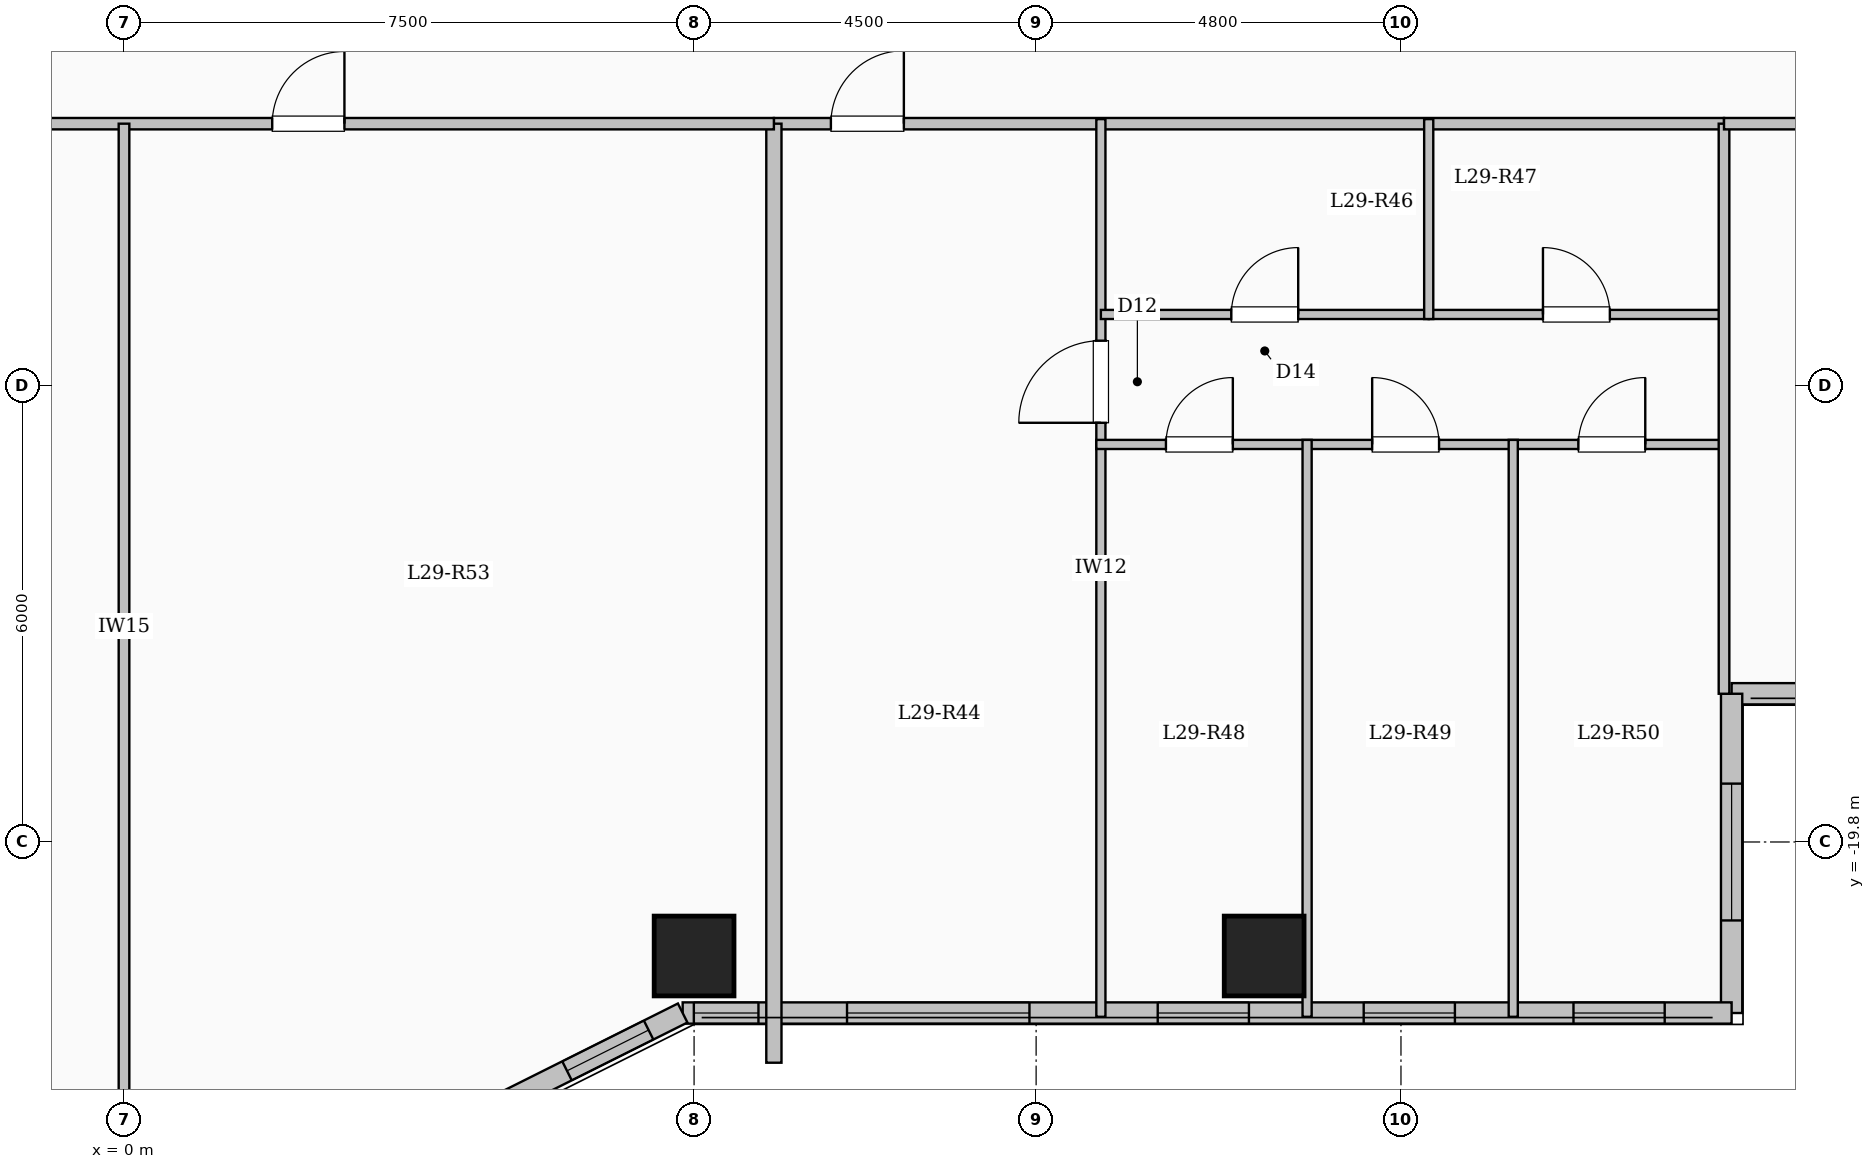
"""IFC4 building model, lengths in metres.
Left out: names, types, materials, properties, quantities, classifications, styles, units other than length and angle.
Written with IfcOpenShell. Run it as: python <this file> out.ifc"""

import sys

from ifc_helpers import new_model, si_unit, direction, frame, frame_2d, origin, origin_2d, place, context, subcontext, project, spatial, rectangle, extrude, element, fill, save


model = new_model("IFC4")
c1 = context("Model", 3, precision=1e-05, world=origin(), true_north=direction((0.0, 1.0)))
c2 = subcontext(c1, "Body", "Model", "MODEL_VIEW")
j1 = project(units=[si_unit("LENGTHUNIT", "METRE"), si_unit("PLANEANGLEUNIT", "RADIAN")], contexts=[c1])
p1 = place(None, origin())
s1 = spatial("IfcSite", under=j1, at=p1, CompositionType="ELEMENT")
p2 = place(p1, origin())
s2 = spatial("IfcBuilding", under=s1, at=p2, CompositionType="ELEMENT")
p3 = place(p2, frame((0.0, 0.0, 108.45)))
s3 = spatial("IfcBuildingStorey", under=s2, at=p3, CompositionType="ELEMENT", Elevation=108.45)
for number, where, z_axis, x_axis in (
    (1, (7.5, -21.3, 0.0), (0.0, 0.0, 1.0), (1.0, 0.0, 0.0)),
    (2, (15.0, -21.3, 0.0), (0.0, 0.0, 1.0), (1.0, 0.0, 0.0)),
):
    element("IfcColumn", number, at=place(p3, frame(where, z_axis=z_axis, x_axis=x_axis)), inside=s3, PredefinedType="COLUMN", context=c2, shape_type="SweptSolid", body=[
        extrude(rectangle(XDim=1.05, YDim=1.05, at=origin_2d()), origin(), (0.0, 0.0, 1.0), 3.35),
    ])
p4 = place(p3, frame((26.85, -17.85, 0.0), z_axis=(0.0, 0.0, 1.0), x_axis=(-1.0, 0.0, 0.0)))
e3 = element("IfcWall", 3, at=p4, inside=s3, PredefinedType="SOLIDWALL", context=c2, shape_type="SweptSolid", body=[
    extrude(rectangle(XDim=5.7, YDim=0.28, at=frame_2d((2.85, 0.0))), origin(), (0.0, 0.0, 1.0), 3.1),
])
p5 = place(p4, frame((1.675, 0.0, 0.9)))
e4 = element("IfcOpeningElement", 4, at=p5, cuts=e3, PredefinedType="OPENING", context=c2, shape_type="SweptSolid", body=[
    extrude(rectangle(XDim=2.4, YDim=1.8, at=frame_2d((1.2, 0.9))), frame((0.0, 0.15, 0.0), z_axis=(0.0, -1.0, 0.0), x_axis=(1.0, 0.0, 0.0)), (0.0, 0.0, 1.0), 0.3),
])
p6 = place(p3, frame((21.15, -17.85, 0.0), z_axis=(0.0, 0.0, 1.0), x_axis=(0.0, -1.0, 0.0)))
e5 = element("IfcWall", 5, at=p6, inside=s3, PredefinedType="SOLIDWALL", context=c2, shape_type="SweptSolid", body=[
    extrude(rectangle(XDim=4.2, YDim=0.28, at=frame_2d((2.1, 0.0))), origin(), (0.0, 0.0, 1.0), 3.1),
])
p7 = place(p6, frame((1.182, 0.0, 0.9)))
e6 = element("IfcOpeningElement", 6, at=p7, cuts=e5, PredefinedType="OPENING", context=c2, shape_type="SweptSolid", body=[
    extrude(rectangle(XDim=1.8, YDim=1.65, at=frame_2d((0.9, 0.825))), frame((0.0, 0.15, 0.0), z_axis=(0.0, -1.0, 0.0), x_axis=(1.0, 0.0, 0.0)), (0.0, 0.0, 1.0), 0.3),
])
p8 = place(p3, frame((21.15, -22.05, 0.0), z_axis=(0.0, 0.0, 1.0), x_axis=(-1.0, 0.0, 0.0)))
e7 = element("IfcWall", 7, at=p8, inside=s3, PredefinedType="SOLIDWALL", context=c2, shape_type="SweptSolid", body=[
    extrude(rectangle(XDim=13.8, YDim=0.28, at=frame_2d((6.9, 0.0))), origin(), (0.0, 0.0, 1.0), 3.1),
])
p9 = place(p8, frame((0.88, 0.0, 0.95)))
e8 = element("IfcOpeningElement", 8, at=p9, cuts=e7, PredefinedType="OPENING", context=c2, shape_type="SweptSolid", body=[
    extrude(rectangle(XDim=1.2, YDim=1.5, at=frame_2d((0.6, 0.75))), frame((0.0, 0.15, 0.0), z_axis=(0.0, -1.0, 0.0), x_axis=(1.0, 0.0, 0.0)), (0.0, 0.0, 1.0), 0.3),
])
p10 = place(p8, frame((3.64, 0.0, 0.95)))
e9 = element("IfcOpeningElement", 9, at=p10, cuts=e7, PredefinedType="OPENING", context=c2, shape_type="SweptSolid", body=[
    extrude(rectangle(XDim=1.2, YDim=1.5, at=frame_2d((0.6, 0.75))), frame((0.0, 0.15, 0.0), z_axis=(0.0, -1.0, 0.0), x_axis=(1.0, 0.0, 0.0)), (0.0, 0.0, 1.0), 0.3),
])
p11 = place(p8, frame((6.35, 0.0, 0.95)))
e10 = element("IfcOpeningElement", 10, at=p11, cuts=e7, PredefinedType="OPENING", context=c2, shape_type="SweptSolid", body=[
    extrude(rectangle(XDim=1.2, YDim=1.5, at=frame_2d((0.6, 0.75))), frame((0.0, 0.15, 0.0), z_axis=(0.0, -1.0, 0.0), x_axis=(1.0, 0.0, 0.0)), (0.0, 0.0, 1.0), 0.3),
])
p12 = place(p8, frame((9.238, 0.0, 0.9)))
e11 = element("IfcOpeningElement", 11, at=p12, cuts=e7, PredefinedType="OPENING", context=c2, shape_type="SweptSolid", body=[
    extrude(rectangle(XDim=2.4, YDim=1.8, at=frame_2d((1.2, 0.9))), frame((0.0, 0.15, 0.0), z_axis=(0.0, -1.0, 0.0), x_axis=(1.0, 0.0, 0.0)), (0.0, 0.0, 1.0), 0.3),
])
p13 = place(p8, frame((12.803, 0.0, 0.95)))
e12 = element("IfcOpeningElement", 12, at=p13, cuts=e7, PredefinedType="OPENING", context=c2, shape_type="SweptSolid", body=[
    extrude(rectangle(XDim=0.85, YDim=1.5, at=frame_2d((0.425, 0.75))), frame((0.0, 0.15, 0.0), z_axis=(0.0, -1.0, 0.0), x_axis=(1.0, 0.0, 0.0)), (0.0, 0.0, 1.0), 0.3),
])
p14 = place(p3, frame((7.35, -22.05, 0.0), z_axis=(0.0, 0.0, 1.0), x_axis=(-0.894427191, -0.4472135955, 0.0)))
e13 = element("IfcWall", 13, at=p14, inside=s3, PredefinedType="SOLIDWALL", context=c2, shape_type="SweptSolid", body=[
    extrude(rectangle(XDim=3.354, YDim=0.28, at=frame_2d((1.677, 0.0))), origin(), (0.0, 0.0, 1.0), 3.1),
])
p15 = place(p14, frame((0.501, 0.0, 0.95)))
e14 = element("IfcOpeningElement", 14, at=p15, cuts=e13, PredefinedType="OPENING", context=c2, shape_type="SweptSolid", body=[
    extrude(rectangle(XDim=1.2, YDim=1.5, at=frame_2d((0.6, 0.75))), frame((0.0, 0.15, 0.0), z_axis=(0.0, -1.0, 0.0), x_axis=(1.0, 0.0, 0.0)), (0.0, 0.0, 1.0), 0.3),
])
p16 = place(p3, frame((8.55, -10.35, 0.0), z_axis=(0.0, 0.0, 1.0), x_axis=(1.0, 0.0, 0.0)))
e15 = element("IfcWall", 15, at=p16, inside=s3, PredefinedType="PARTITIONING", context=c2, shape_type="SweptSolid", body=[
    extrude(rectangle(XDim=12.5, YDim=0.15, at=frame_2d((6.25, 0.0))), origin(), (0.0, 0.0, 1.0), 3.1),
])
p17 = place(p16, frame((0.75, 0.0, 0.0)))
e16 = element("IfcOpeningElement", 16, at=p17, cuts=e15, PredefinedType="OPENING", context=c2, shape_type="SweptSolid", body=[
    extrude(rectangle(XDim=0.96, YDim=2.15, at=frame_2d((0.48, 1.075))), frame((0.0, 0.085, 0.0), z_axis=(0.0, -1.0, 0.0), x_axis=(1.0, 0.0, 0.0)), (0.0, 0.0, 1.0), 0.17),
])
p18 = place(p3, frame((12.852, -22.1, 0.0), z_axis=(0.0, 0.0, 1.0), x_axis=(0.0, 1.0, 0.0)))
e17 = element("IfcWall", 17, at=p18, inside=s3, PredefinedType="PARTITIONING", context=c2, shape_type="SweptSolid", body=[
    extrude(rectangle(XDim=11.81, YDim=0.12, at=frame_2d((5.905, 0.0))), origin(), (0.0, 0.0, 1.0), 3.1),
])
p19 = place(p18, frame((7.815, 0.0, 0.0)))
e18 = element("IfcOpeningElement", 18, at=p19, cuts=e17, PredefinedType="OPENING", context=c2, shape_type="SweptSolid", body=[
    extrude(rectangle(XDim=1.08, YDim=2.15, at=frame_2d((0.54, 1.075))), frame((0.0, 0.07, 0.0), z_axis=(0.0, -1.0, 0.0), x_axis=(1.0, 0.0, 0.0)), (0.0, 0.0, 1.0), 0.14),
])
p20 = place(p3, frame((12.852, -12.86, 0.0), z_axis=(0.0, 0.0, 1.0), x_axis=(1.0, 0.0, 0.0)))
e19 = element("IfcWall", 19, at=p20, inside=s3, PredefinedType="PARTITIONING", context=c2, shape_type="SweptSolid", body=[
    extrude(rectangle(XDim=4.313, YDim=0.12, at=frame_2d((2.156, 0.0))), origin(), (0.0, 0.0, 1.0), 3.1),
])
p21 = place(p20, frame((1.716, 0.0, 0.0)))
e20 = element("IfcOpeningElement", 20, at=p21, cuts=e19, PredefinedType="OPENING", context=c2, shape_type="SweptSolid", body=[
    extrude(rectangle(XDim=0.88, YDim=2.1, at=frame_2d((0.44, 1.05))), frame((0.0, 0.07, 0.0), z_axis=(0.0, -1.0, 0.0), x_axis=(1.0, 0.0, 0.0)), (0.0, 0.0, 1.0), 0.14),
])
p22 = place(p3, frame((17.165, -12.86, 0.0), z_axis=(0.0, 0.0, 1.0), x_axis=(1.0, 0.0, 0.0)))
e21 = element("IfcWall", 21, at=p22, inside=s3, PredefinedType="PARTITIONING", context=c2, shape_type="SweptSolid", body=[
    extrude(rectangle(XDim=3.885, YDim=0.12, at=frame_2d((1.942, 0.0))), origin(), (0.0, 0.0, 1.0), 3.1),
])
p23 = place(p22, frame((1.503, 0.0, 0.0)))
e22 = element("IfcOpeningElement", 22, at=p23, cuts=e21, PredefinedType="OPENING", context=c2, shape_type="SweptSolid", body=[
    extrude(rectangle(XDim=0.88, YDim=2.1, at=frame_2d((0.44, 1.05))), frame((0.0, 0.07, 0.0), z_axis=(0.0, -1.0, 0.0), x_axis=(1.0, 0.0, 0.0)), (0.0, 0.0, 1.0), 0.14),
])
p24 = place(p3, frame((12.792, -14.57, 0.0), z_axis=(0.0, 0.0, 1.0), x_axis=(1.0, 0.0, 0.0)))
e23 = element("IfcWall", 23, at=p24, inside=s3, PredefinedType="PARTITIONING", context=c2, shape_type="SweptSolid", body=[
    extrude(rectangle(XDim=8.318, YDim=0.12, at=frame_2d((4.159, 0.0))), origin(), (0.0, 0.0, 1.0), 2.635),
])
p25 = place(p24, frame((0.916, 0.0, 0.0)))
e24 = element("IfcOpeningElement", 24, at=p25, cuts=e23, PredefinedType="OPENING", context=c2, shape_type="SweptSolid", body=[
    extrude(rectangle(XDim=0.88, YDim=2.1, at=frame_2d((0.44, 1.05))), frame((0.0, 0.07, 0.0), z_axis=(0.0, -1.0, 0.0), x_axis=(1.0, 0.0, 0.0)), (0.0, 0.0, 1.0), 0.14),
])
p26 = place(p24, frame((3.629, 0.0, 0.0)))
e25 = element("IfcOpeningElement", 25, at=p26, cuts=e23, PredefinedType="OPENING", context=c2, shape_type="SweptSolid", body=[
    extrude(rectangle(XDim=0.88, YDim=2.1, at=frame_2d((0.44, 1.05))), frame((0.0, 0.07, 0.0), z_axis=(0.0, -1.0, 0.0), x_axis=(1.0, 0.0, 0.0)), (0.0, 0.0, 1.0), 0.14),
])
p27 = place(p24, frame((6.342, 0.0, 0.0)))
e26 = element("IfcOpeningElement", 26, at=p27, cuts=e23, PredefinedType="OPENING", context=c2, shape_type="SweptSolid", body=[
    extrude(rectangle(XDim=0.88, YDim=2.1, at=frame_2d((0.44, 1.05))), frame((0.0, 0.07, 0.0), z_axis=(0.0, -1.0, 0.0), x_axis=(1.0, 0.0, 0.0)), (0.0, 0.0, 1.0), 0.14),
])
p28 = place(p3, frame((17.165, -12.92, 0.0), z_axis=(0.0, 0.0, 1.0), x_axis=(0.0, 1.0, 0.0)))
e27 = element("IfcWall", 27, at=p28, inside=s3, PredefinedType="PARTITIONING", context=c2, shape_type="SweptSolid", body=[
    extrude(rectangle(XDim=2.63, YDim=0.12, at=frame_2d((1.315, 0.0))), origin(), (0.0, 0.0, 1.0), 3.1),
])
for number, where, z_axis, x_axis in (
    (28, (15.565, -22.1, 0.0), (0.0, 0.0, 1.0), (0.0, 1.0, 0.0)),
    (29, (18.277, -22.1, 0.0), (0.0, 0.0, 1.0), (0.0, 1.0, 0.0)),
):
    element("IfcWall", number, at=place(p3, frame(where, z_axis=z_axis, x_axis=x_axis)), inside=s3, PredefinedType="PARTITIONING", context=c2, shape_type="SweptSolid", body=[
        extrude(rectangle(XDim=7.59, YDim=0.12, at=frame_2d((3.795, 0.0))), origin(), (0.0, 0.0, 1.0), 3.1),
    ])
p29 = place(p3, frame((8.55, -22.704, 0.0), z_axis=(0.0, 0.0, 1.0), x_axis=(0.0, 1.0, 0.0)))
e30 = element("IfcWall", 30, at=p29, inside=s3, PredefinedType="SOLIDWALL", context=c2, shape_type="SweptSolid", body=[
    extrude(rectangle(XDim=12.354, YDim=0.2, at=frame_2d((6.177, 0.0))), origin(), (0.0, 0.0, 1.0), 3.1),
])
p30 = place(p3, frame((-8.55, -10.35, 0.0), z_axis=(0.0, 0.0, 1.0), x_axis=(1.0, 0.0, 0.0)))
e31 = element("IfcWall", 31, at=p30, inside=s3, PredefinedType="PARTITIONING", context=c2, shape_type="SweptSolid", body=[
    extrude(rectangle(XDim=17.1, YDim=0.15, at=frame_2d((8.55, 0.0))), origin(), (0.0, 0.0, 1.0), 3.1),
])
p31 = place(p30, frame((1.6, 0.0, 0.0)))
e32 = element("IfcOpeningElement", 32, at=p31, cuts=e31, PredefinedType="OPENING", context=c2, shape_type="SweptSolid", body=[
    extrude(rectangle(XDim=0.95, YDim=2.15, at=frame_2d((0.475, 1.075))), frame((0.0, 0.085, 0.0), z_axis=(0.0, -1.0, 0.0), x_axis=(1.0, 0.0, 0.0)), (0.0, 0.0, 1.0), 0.17),
])
p32 = place(p30, frame((10.5, 0.0, 0.0)))
e33 = element("IfcOpeningElement", 33, at=p32, cuts=e31, PredefinedType="OPENING", context=c2, shape_type="SweptSolid", body=[
    extrude(rectangle(XDim=0.95, YDim=2.15, at=frame_2d((0.475, 1.075))), frame((0.0, 0.085, 0.0), z_axis=(0.0, -1.0, 0.0), x_axis=(1.0, 0.0, 0.0)), (0.0, 0.0, 1.0), 0.17),
])
p33 = place(p3, frame((0.0, -23.58, 0.0), z_axis=(0.0, 0.0, 1.0), x_axis=(0.0, 1.0, 0.0)))
e34 = element("IfcWall", 34, at=p33, inside=s3, PredefinedType="PARTITIONING", context=c2, shape_type="SweptSolid", body=[
    extrude(rectangle(XDim=13.23, YDim=0.14, at=frame_2d((6.615, 0.0))), origin(), (0.0, 0.0, 1.0), 3.1),
])
p34 = place(p3, frame((21.05, -17.85, 0.0), z_axis=(0.0, 0.0, 1.0), x_axis=(0.0, 1.0, 0.0)))
e35 = element("IfcWall", 35, at=p34, inside=s3, PredefinedType="PARTITIONING", context=c2, shape_type="SweptSolid", body=[
    extrude(rectangle(XDim=7.5, YDim=0.14, at=frame_2d((3.75, 0.0))), origin(), (0.0, 0.0, 1.0), 3.1),
])
p35 = place(p3, frame((21.05, -10.35, 0.0), z_axis=(0.0, 0.0, 1.0), x_axis=(1.0, 0.0, 0.0)))
e36 = element("IfcWall", 36, at=p35, inside=s3, PredefinedType="PARTITIONING", context=c2, shape_type="SweptSolid", body=[
    extrude(rectangle(XDim=5.83, YDim=0.15, at=frame_2d((2.915, 0.0))), origin(), (0.0, 0.0, 1.0), 3.1),
])
p36 = place(p35, frame((2.44, 0.0, 0.0)))
e37 = element("IfcOpeningElement", 37, at=p36, cuts=e36, PredefinedType="OPENING", context=c2, shape_type="SweptSolid", body=[
    extrude(rectangle(XDim=0.95, YDim=2.15, at=frame_2d((0.475, 1.075))), frame((0.0, 0.085, 0.0), z_axis=(0.0, -1.0, 0.0), x_axis=(1.0, 0.0, 0.0)), (0.0, 0.0, 1.0), 0.17),
])
p37 = place(p7, origin())
e38 = element("IfcWindow", 38, at=p37, inside=s3, PartitioningType="SINGLE_PANEL", PredefinedType="WINDOW", context=c2, shape_type="SweptSolid", body=[
    extrude(rectangle(XDim=1.8, YDim=1.65, at=frame_2d((0.9, 0.825))), frame((0.0, 0.03, 0.0), z_axis=(0.0, -1.0, 0.0), x_axis=(1.0, 0.0, 0.0)), (0.0, 0.0, 1.0), 0.06),
])
fill(e6, e38)
p38 = place(p9, origin())
e39 = element("IfcWindow", 39, at=p38, inside=s3, PartitioningType="SINGLE_PANEL", PredefinedType="WINDOW", context=c2, shape_type="SweptSolid", body=[
    extrude(rectangle(XDim=1.2, YDim=1.5, at=frame_2d((0.6, 0.75))), frame((0.0, 0.03, 0.0), z_axis=(0.0, -1.0, 0.0), x_axis=(1.0, 0.0, 0.0)), (0.0, 0.0, 1.0), 0.06),
])
fill(e8, e39)
p39 = place(p10, origin())
e40 = element("IfcWindow", 40, at=p39, inside=s3, PartitioningType="SINGLE_PANEL", PredefinedType="WINDOW", context=c2, shape_type="SweptSolid", body=[
    extrude(rectangle(XDim=1.2, YDim=1.5, at=frame_2d((0.6, 0.75))), frame((0.0, 0.03, 0.0), z_axis=(0.0, -1.0, 0.0), x_axis=(1.0, 0.0, 0.0)), (0.0, 0.0, 1.0), 0.06),
])
fill(e9, e40)
p40 = place(p11, origin())
e41 = element("IfcWindow", 41, at=p40, inside=s3, PartitioningType="SINGLE_PANEL", PredefinedType="WINDOW", context=c2, shape_type="SweptSolid", body=[
    extrude(rectangle(XDim=1.2, YDim=1.5, at=frame_2d((0.6, 0.75))), frame((0.0, 0.03, 0.0), z_axis=(0.0, -1.0, 0.0), x_axis=(1.0, 0.0, 0.0)), (0.0, 0.0, 1.0), 0.06),
])
fill(e10, e41)
p41 = place(p12, origin())
e42 = element("IfcWindow", 42, at=p41, inside=s3, PartitioningType="SINGLE_PANEL", PredefinedType="WINDOW", context=c2, shape_type="SweptSolid", body=[
    extrude(rectangle(XDim=2.4, YDim=1.8, at=frame_2d((1.2, 0.9))), frame((0.0, 0.03, 0.0), z_axis=(0.0, -1.0, 0.0), x_axis=(1.0, 0.0, 0.0)), (0.0, 0.0, 1.0), 0.06),
])
fill(e11, e42)
p42 = place(p13, origin())
e43 = element("IfcWindow", 43, at=p42, inside=s3, PartitioningType="SINGLE_PANEL", PredefinedType="WINDOW", context=c2, shape_type="SweptSolid", body=[
    extrude(rectangle(XDim=0.85, YDim=1.5, at=frame_2d((0.425, 0.75))), frame((0.0, 0.03, 0.0), z_axis=(0.0, -1.0, 0.0), x_axis=(1.0, 0.0, 0.0)), (0.0, 0.0, 1.0), 0.06),
])
fill(e12, e43)
p43 = place(p15, origin())
e44 = element("IfcWindow", 44, at=p43, inside=s3, PartitioningType="SINGLE_PANEL", PredefinedType="WINDOW", context=c2, shape_type="SweptSolid", body=[
    extrude(rectangle(XDim=1.2, YDim=1.5, at=frame_2d((0.6, 0.75))), frame((0.0, 0.03, 0.0), z_axis=(0.0, -1.0, 0.0), x_axis=(1.0, 0.0, 0.0)), (0.0, 0.0, 1.0), 0.06),
])
fill(e14, e44)
p44 = place(p17, origin())
e45 = element("IfcDoor", 45, at=p44, inside=s3, OperationType="SINGLE_SWING_RIGHT", PredefinedType="DOOR", context=c2, shape_type="SweptSolid", body=[
    extrude(rectangle(XDim=0.96, YDim=2.15, at=frame_2d((0.48, 1.075))), frame((0.0, 0.025, 0.0), z_axis=(0.0, -1.0, 0.0), x_axis=(1.0, 0.0, 0.0)), (0.0, 0.0, 1.0), 0.05),
])
fill(e16, e45)
p45 = place(p19, origin())
e46 = element("IfcDoor", 46, at=p45, inside=s3, OperationType="SINGLE_SWING_LEFT", PredefinedType="DOOR", context=c2, shape_type="SweptSolid", body=[
    extrude(rectangle(XDim=1.08, YDim=2.15, at=frame_2d((0.54, 1.075))), frame((0.0, 0.025, 0.0), z_axis=(0.0, -1.0, 0.0), x_axis=(1.0, 0.0, 0.0)), (0.0, 0.0, 1.0), 0.05),
])
fill(e18, e46)
p46 = place(p21, origin())
e47 = element("IfcDoor", 47, at=p46, inside=s3, OperationType="SINGLE_SWING_RIGHT", PredefinedType="DOOR", context=c2, shape_type="SweptSolid", body=[
    extrude(rectangle(XDim=0.88, YDim=2.1, at=frame_2d((0.44, 1.05))), frame((0.0, 0.025, 0.0), z_axis=(0.0, -1.0, 0.0), x_axis=(1.0, 0.0, 0.0)), (0.0, 0.0, 1.0), 0.05),
])
fill(e20, e47)
p47 = place(p23, origin())
e48 = element("IfcDoor", 48, at=p47, inside=s3, OperationType="SINGLE_SWING_LEFT", PredefinedType="DOOR", context=c2, shape_type="SweptSolid", body=[
    extrude(rectangle(XDim=0.88, YDim=2.1, at=frame_2d((0.44, 1.05))), frame((0.0, 0.025, 0.0), z_axis=(0.0, -1.0, 0.0), x_axis=(1.0, 0.0, 0.0)), (0.0, 0.0, 1.0), 0.05),
])
fill(e22, e48)
p48 = place(p25, origin())
e49 = element("IfcDoor", 49, at=p48, inside=s3, OperationType="SINGLE_SWING_RIGHT", PredefinedType="DOOR", context=c2, shape_type="SweptSolid", body=[
    extrude(rectangle(XDim=0.88, YDim=2.1, at=frame_2d((0.44, 1.05))), frame((0.0, 0.025, 0.0), z_axis=(0.0, -1.0, 0.0), x_axis=(1.0, 0.0, 0.0)), (0.0, 0.0, 1.0), 0.05),
])
fill(e24, e49)
p49 = place(p26, origin())
e50 = element("IfcDoor", 50, at=p49, inside=s3, OperationType="SINGLE_SWING_LEFT", PredefinedType="DOOR", context=c2, shape_type="SweptSolid", body=[
    extrude(rectangle(XDim=0.88, YDim=2.1, at=frame_2d((0.44, 1.05))), frame((0.0, 0.025, 0.0), z_axis=(0.0, -1.0, 0.0), x_axis=(1.0, 0.0, 0.0)), (0.0, 0.0, 1.0), 0.05),
])
fill(e25, e50)
p50 = place(p27, origin())
e51 = element("IfcDoor", 51, at=p50, inside=s3, OperationType="SINGLE_SWING_RIGHT", PredefinedType="DOOR", context=c2, shape_type="SweptSolid", body=[
    extrude(rectangle(XDim=0.88, YDim=2.1, at=frame_2d((0.44, 1.05))), frame((0.0, 0.025, 0.0), z_axis=(0.0, -1.0, 0.0), x_axis=(1.0, 0.0, 0.0)), (0.0, 0.0, 1.0), 0.05),
])
fill(e26, e51)
p51 = place(p32, origin())
e52 = element("IfcDoor", 52, at=p51, inside=s3, OperationType="SINGLE_SWING_RIGHT", PredefinedType="DOOR", context=c2, shape_type="SweptSolid", body=[
    extrude(rectangle(XDim=0.95, YDim=2.15, at=frame_2d((0.475, 1.075))), frame((0.0, 0.025, 0.0), z_axis=(0.0, -1.0, 0.0), x_axis=(1.0, 0.0, 0.0)), (0.0, 0.0, 1.0), 0.05),
])
fill(e33, e52)
save(model, sys.argv[1])
